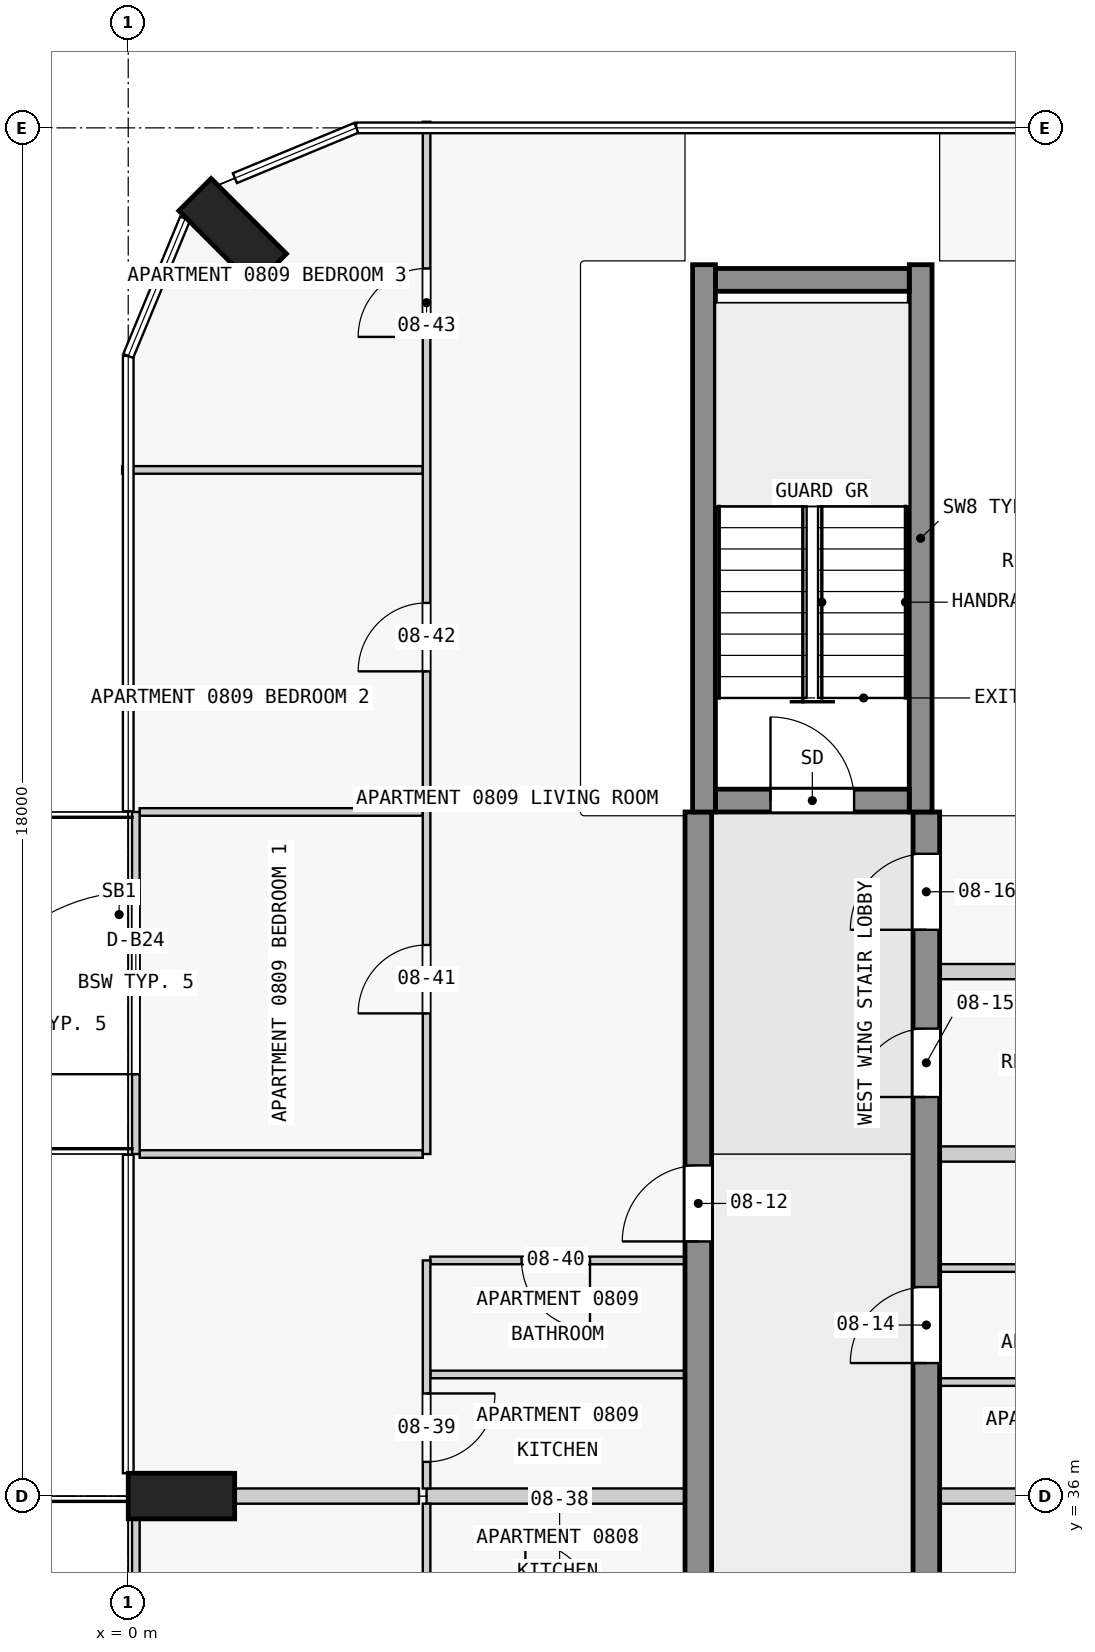
"""IFC4 building model, lengths in metres.
Left out: names, types, materials, properties, quantities, classifications, styles, units other than length and angle.
Written with IfcOpenShell. Run it as: python <this file> out.ifc"""

import sys

from ifc_helpers import new_model, si_unit, direction, frame, frame_2d, origin, origin_2d, place, context, subcontext, project, spatial, rectangle, extrude, element, fill, save


model = new_model("IFC4")
c1 = context("Model", 3, precision=1e-05, world=origin(), true_north=direction((0.0, 1.0)))
c2 = subcontext(c1, "Body", "Model", "MODEL_VIEW")
j1 = project(units=[si_unit("LENGTHUNIT", "METRE"), si_unit("PLANEANGLEUNIT", "RADIAN")], contexts=[c1])
p1 = place(None, origin())
s1 = spatial("IfcSite", under=j1, at=p1, CompositionType="ELEMENT")
p2 = place(p1, origin())
s2 = spatial("IfcBuilding", under=s1, at=p2, CompositionType="ELEMENT")
p3 = place(p2, frame((0.0, 0.0, 37.3)))
s3 = spatial("IfcBuildingStorey", under=s2, at=p3, CompositionType="ELEMENT", Elevation=37.3)
for number, where, z_axis, x_axis in (
    (1, (1.374, 52.626, 0.0), (0.0, 0.0, 1.0), (0.707, 0.707, 0.0)),
    (2, (0.7, 36.0, 0.0), (0.0, 0.0, 1.0), (0.0, 1.0, 0.0)),
):
    element("IfcColumn", number, at=place(p3, frame(where, z_axis=z_axis, x_axis=x_axis)), inside=s3, PredefinedType="COLUMN", context=c2, shape_type="SweptSolid", body=[
        extrude(rectangle(XDim=0.6, YDim=1.4, at=origin_2d()), origin(), (0.0, 0.0, 1.0), 3.5),
    ])
p4 = place(p3, frame((7.725, 45.15, 0.0), z_axis=(0.0, 0.0, 1.0), x_axis=(1.0, 0.0, 0.0)))
e3 = element("IfcWall", 3, at=p4, inside=s3, PredefinedType="SHEAR", context=c2, shape_type="SweptSolid", body=[
    extrude(rectangle(XDim=2.55, YDim=0.3, at=frame_2d((1.275, 0.0))), origin(), (0.0, 0.0, 1.0), 3.5),
])
p5 = place(p4, frame((0.725, 0.0, 0.0)))
e4 = element("IfcOpeningElement", 4, at=p5, cuts=e3, PredefinedType="OPENING", context=c2, shape_type="SweptSolid", body=[
    extrude(rectangle(XDim=1.1, YDim=2.1, at=frame_2d((0.55, 1.05))), frame((0.0, 0.16, 0.0), z_axis=(0.0, -1.0, 0.0), x_axis=(1.0, 0.0, 0.0)), (0.0, 0.0, 1.0), 0.32),
])
p6 = place(p3, frame((7.725, 52.0, 0.0), z_axis=(0.0, 0.0, 1.0), x_axis=(1.0, 0.0, 0.0)))
e5 = element("IfcWall", 5, at=p6, inside=s3, PredefinedType="SHEAR", context=c2, shape_type="SweptSolid", body=[
    extrude(rectangle(XDim=2.55, YDim=0.3, at=frame_2d((1.275, 0.0))), origin(), (0.0, 0.0, 1.0), 3.5),
])
for number, where, z_axis, x_axis in (
    (6, (7.575, 45.0, 0.0), (0.0, 0.0, 1.0), (0.0, 1.0, 0.0)),
    (7, (10.425, 45.0, 0.0), (0.0, 0.0, 1.0), (0.0, 1.0, 0.0)),
):
    element("IfcWall", number, at=place(p3, frame(where, z_axis=z_axis, x_axis=x_axis)), inside=s3, PredefinedType="SHEAR", context=c2, shape_type="SweptSolid", body=[
        extrude(rectangle(XDim=7.2, YDim=0.3, at=frame_2d((3.6, 0.0))), origin(), (0.0, 0.0, 1.0), 3.5),
    ])
p7 = place(p3, frame((7.5, 18.0, 0.0), z_axis=(0.0, 0.0, 1.0), x_axis=(0.0, 1.0, 0.0)))
e8 = element("IfcWall", 8, at=p7, inside=s3, PredefinedType="SHEAR", context=c2, shape_type="SweptSolid", body=[
    extrude(rectangle(XDim=27.0, YDim=0.35, at=frame_2d((13.5, 0.0))), origin(), (0.0, 0.0, 1.0), 3.25),
])
p8 = place(p7, frame((1.75, 0.0, 0.0)))
e9 = element("IfcOpeningElement", 9, at=p8, cuts=e8, PredefinedType="OPENING", context=c2, shape_type="SweptSolid", body=[
    extrude(rectangle(XDim=1.0, YDim=2.1, at=frame_2d((0.5, 1.05))), frame((0.0, 0.185, 0.0), z_axis=(0.0, -1.0, 0.0), x_axis=(1.0, 0.0, 0.0)), (0.0, 0.0, 1.0), 0.37),
])
p9 = place(p7, frame((8.55, 0.0, 0.0)))
e10 = element("IfcOpeningElement", 10, at=p9, cuts=e8, PredefinedType="OPENING", context=c2, shape_type="SweptSolid", body=[
    extrude(rectangle(XDim=1.0, YDim=2.1, at=frame_2d((0.5, 1.05))), frame((0.0, 0.185, 0.0), z_axis=(0.0, -1.0, 0.0), x_axis=(1.0, 0.0, 0.0)), (0.0, 0.0, 1.0), 0.37),
])
p10 = place(p7, frame((15.25, 0.0, 0.0)))
e11 = element("IfcOpeningElement", 11, at=p10, cuts=e8, PredefinedType="OPENING", context=c2, shape_type="SweptSolid", body=[
    extrude(rectangle(XDim=1.0, YDim=2.1, at=frame_2d((0.5, 1.05))), frame((0.0, 0.185, 0.0), z_axis=(0.0, -1.0, 0.0), x_axis=(1.0, 0.0, 0.0)), (0.0, 0.0, 1.0), 0.37),
])
p11 = place(p7, frame((21.35, 0.0, 0.0)))
e12 = element("IfcOpeningElement", 12, at=p11, cuts=e8, PredefinedType="OPENING", context=c2, shape_type="SweptSolid", body=[
    extrude(rectangle(XDim=1.0, YDim=2.1, at=frame_2d((0.5, 1.05))), frame((0.0, 0.185, 0.0), z_axis=(0.0, -1.0, 0.0), x_axis=(1.0, 0.0, 0.0)), (0.0, 0.0, 1.0), 0.37),
])
p12 = place(p3, frame((10.5, 18.0, 0.0), z_axis=(0.0, 0.0, 1.0), x_axis=(0.0, 1.0, 0.0)))
e13 = element("IfcWall", 13, at=p12, inside=s3, PredefinedType="SHEAR", context=c2, shape_type="SweptSolid", body=[
    extrude(rectangle(XDim=27.0, YDim=0.35, at=frame_2d((13.5, 0.0))), origin(), (0.0, 0.0, 1.0), 3.25),
])
p13 = place(p12, frame((7.45, 0.0, 0.0)))
e14 = element("IfcOpeningElement", 14, at=p13, cuts=e13, PredefinedType="OPENING", context=c2, shape_type="SweptSolid", body=[
    extrude(rectangle(XDim=1.0, YDim=2.1, at=frame_2d((0.5, 1.05))), frame((0.0, 0.185, 0.0), z_axis=(0.0, -1.0, 0.0), x_axis=(1.0, 0.0, 0.0)), (0.0, 0.0, 1.0), 0.37),
])
p14 = place(p12, frame((19.75, 0.0, 0.0)))
e15 = element("IfcOpeningElement", 15, at=p14, cuts=e13, PredefinedType="OPENING", context=c2, shape_type="SweptSolid", body=[
    extrude(rectangle(XDim=1.0, YDim=2.1, at=frame_2d((0.5, 1.05))), frame((0.0, 0.185, 0.0), z_axis=(0.0, -1.0, 0.0), x_axis=(1.0, 0.0, 0.0)), (0.0, 0.0, 1.0), 0.37),
])
p15 = place(p12, frame((23.25, 0.0, 0.0)))
e16 = element("IfcOpeningElement", 16, at=p15, cuts=e13, PredefinedType="OPENING", context=c2, shape_type="SweptSolid", body=[
    extrude(rectangle(XDim=0.9, YDim=2.1, at=frame_2d((0.45, 1.05))), frame((0.0, 0.185, 0.0), z_axis=(0.0, -1.0, 0.0), x_axis=(1.0, 0.0, 0.0)), (0.0, 0.0, 1.0), 0.37),
])
p16 = place(p12, frame((25.45, 0.0, 0.0)))
e17 = element("IfcOpeningElement", 17, at=p16, cuts=e13, PredefinedType="OPENING", context=c2, shape_type="SweptSolid", body=[
    extrude(rectangle(XDim=1.0, YDim=2.1, at=frame_2d((0.5, 1.05))), frame((0.0, 0.185, 0.0), z_axis=(0.0, -1.0, 0.0), x_axis=(1.0, 0.0, 0.0)), (0.0, 0.0, 1.0), 0.37),
])
p17 = place(p3, frame((0.1, 31.5, 0.0), z_axis=(0.0, 0.0, 1.0), x_axis=(0.0, 1.0, 0.0)))
e18 = element("IfcWall", 18, at=p17, inside=s3, PredefinedType="STANDARD", context=c2, shape_type="SweptSolid", body=[
    extrude(rectangle(XDim=4.5, YDim=0.1, at=frame_2d((2.25, 0.0))), origin(), (0.0, 0.0, 1.0), 3.25),
])
p18 = place(p17, frame((1.05, 0.0, 0.0)))
e19 = element("IfcOpeningElement", 19, at=p18, cuts=e18, PredefinedType="OPENING", context=c2, shape_type="SweptSolid", body=[
    extrude(rectangle(XDim=2.4, YDim=2.4, at=frame_2d((1.2, 1.2))), frame((0.0, 0.06, 0.0), z_axis=(0.0, -1.0, 0.0), x_axis=(1.0, 0.0, 0.0)), (0.0, 0.0, 1.0), 0.12),
])
p19 = place(p3, frame((0.1, 40.5, 0.0), z_axis=(0.0, 0.0, 1.0), x_axis=(0.0, 1.0, 0.0)))
e20 = element("IfcWall", 20, at=p19, inside=s3, PredefinedType="STANDARD", context=c2, shape_type="SweptSolid", body=[
    extrude(rectangle(XDim=4.5, YDim=0.1, at=frame_2d((2.25, 0.0))), origin(), (0.0, 0.0, 1.0), 3.25),
])
p20 = place(p19, frame((1.05, 0.0, 0.0)))
e21 = element("IfcOpeningElement", 21, at=p20, cuts=e20, PredefinedType="OPENING", context=c2, shape_type="SweptSolid", body=[
    extrude(rectangle(XDim=2.4, YDim=2.4, at=frame_2d((1.2, 1.2))), frame((0.0, 0.06, 0.0), z_axis=(0.0, -1.0, 0.0), x_axis=(1.0, 0.0, 0.0)), (0.0, 0.0, 1.0), 0.12),
])
p21 = place(p3, frame((7.325, 36.0, 0.0), z_axis=(0.0, 0.0, 1.0), x_axis=(-1.0, 0.0, 0.0)))
e22 = element("IfcWall", 22, at=p21, inside=s3, PredefinedType="PARTITIONING", context=c2, shape_type="SweptSolid", body=[
    extrude(rectangle(XDim=3.4, YDim=0.2, at=frame_2d((1.7, 0.0))), origin(), (0.0, 0.0, 1.0), 3.25),
])
p22 = place(p3, frame((16.6, 36.0, 0.0), z_axis=(0.0, 0.0, 1.0), x_axis=(-1.0, 0.0, 0.0)))
e23 = element("IfcWall", 23, at=p22, inside=s3, PredefinedType="PARTITIONING", context=c2, shape_type="SweptSolid", body=[
    extrude(rectangle(XDim=5.925, YDim=0.2, at=frame_2d((2.962, 0.0))), origin(), (0.0, 0.0, 1.0), 3.25),
])
p23 = place(p3, frame((1.4, 36.0, 0.0), z_axis=(0.0, 0.0, 1.0), x_axis=(1.0, 0.0, 0.0)))
e24 = element("IfcWall", 24, at=p23, inside=s3, PredefinedType="PARTITIONING", context=c2, shape_type="SweptSolid", body=[
    extrude(rectangle(XDim=2.425, YDim=0.2, at=frame_2d((1.212, 0.0))), origin(), (0.0, 0.0, 1.0), 3.25),
])
p24 = place(p3, frame((14.025, 37.5, 0.0), z_axis=(0.0, 0.0, 1.0), x_axis=(-1.0, 0.0, 0.0)))
e25 = element("IfcWall", 25, at=p24, inside=s3, PredefinedType="PARTITIONING", context=c2, shape_type="SweptSolid", body=[
    extrude(rectangle(XDim=3.35, YDim=0.1, at=frame_2d((1.675, 0.0))), origin(), (0.0, 0.0, 1.0), 3.25),
])
p25 = place(p24, frame((1.25, 0.0, 0.0)))
e26 = element("IfcOpeningElement", 26, at=p25, cuts=e25, PredefinedType="OPENING", context=c2, shape_type="SweptSolid", body=[
    extrude(rectangle(XDim=0.9, YDim=2.1, at=frame_2d((0.45, 1.05))), frame((0.0, 0.06, 0.0), z_axis=(0.0, -1.0, 0.0), x_axis=(1.0, 0.0, 0.0)), (0.0, 0.0, 1.0), 0.12),
])
p26 = place(p3, frame((7.325, 37.6, 0.0), z_axis=(0.0, 0.0, 1.0), x_axis=(-1.0, 0.0, 0.0)))
e27 = element("IfcWall", 27, at=p26, inside=s3, PredefinedType="PARTITIONING", context=c2, shape_type="SweptSolid", body=[
    extrude(rectangle(XDim=3.35, YDim=0.1, at=frame_2d((1.675, 0.0))), origin(), (0.0, 0.0, 1.0), 3.25),
])
p27 = place(p3, frame((10.675, 39.0, 0.0), z_axis=(0.0, 0.0, 1.0), x_axis=(1.0, 0.0, 0.0)))
e28 = element("IfcWall", 28, at=p27, inside=s3, PredefinedType="PARTITIONING", context=c2, shape_type="SweptSolid", body=[
    extrude(rectangle(XDim=3.4, YDim=0.1, at=frame_2d((1.7, 0.0))), origin(), (0.0, 0.0, 1.0), 3.25),
])
p28 = place(p27, frame((1.25, 0.0, 0.0)))
e29 = element("IfcOpeningElement", 29, at=p28, cuts=e28, PredefinedType="OPENING", context=c2, shape_type="SweptSolid", body=[
    extrude(rectangle(XDim=0.9, YDim=2.1, at=frame_2d((0.45, 1.05))), frame((0.0, 0.06, 0.0), z_axis=(0.0, -1.0, 0.0), x_axis=(1.0, 0.0, 0.0)), (0.0, 0.0, 1.0), 0.12),
])
p29 = place(p3, frame((7.325, 39.1, 0.0), z_axis=(0.0, 0.0, 1.0), x_axis=(-1.0, 0.0, 0.0)))
e30 = element("IfcWall", 30, at=p29, inside=s3, PredefinedType="PARTITIONING", context=c2, shape_type="SweptSolid", body=[
    extrude(rectangle(XDim=3.35, YDim=0.1, at=frame_2d((1.675, 0.0))), origin(), (0.0, 0.0, 1.0), 3.25),
])
p30 = place(p29, frame((1.25, 0.0, 0.0)))
e31 = element("IfcOpeningElement", 31, at=p30, cuts=e30, PredefinedType="OPENING", context=c2, shape_type="SweptSolid", body=[
    extrude(rectangle(XDim=0.9, YDim=2.1, at=frame_2d((0.45, 1.05))), frame((0.0, 0.06, 0.0), z_axis=(0.0, -1.0, 0.0), x_axis=(1.0, 0.0, 0.0)), (0.0, 0.0, 1.0), 0.12),
])
p31 = place(p3, frame((0.15, 40.5, 0.0), z_axis=(0.0, 0.0, 1.0), x_axis=(1.0, 0.0, 0.0)))
e32 = element("IfcWall", 32, at=p31, inside=s3, PredefinedType="PARTITIONING", context=c2, shape_type="SweptSolid", body=[
    extrude(rectangle(XDim=3.725, YDim=0.1, at=frame_2d((1.863, 0.0))), origin(), (0.0, 0.0, 1.0), 3.25),
])
p32 = place(p3, frame((13.975, 40.5, 0.0), z_axis=(0.0, 0.0, 1.0), x_axis=(-1.0, 0.0, 0.0)))
e33 = element("IfcWall", 33, at=p32, inside=s3, PredefinedType="PARTITIONING", context=c2, shape_type="SweptSolid", body=[
    extrude(rectangle(XDim=3.3, YDim=0.2, at=frame_2d((1.65, 0.0))), origin(), (0.0, 0.0, 1.0), 3.25),
])
p33 = place(p3, frame((14.075, 42.9, 0.0), z_axis=(0.0, 0.0, 1.0), x_axis=(-1.0, 0.0, 0.0)))
e34 = element("IfcWall", 34, at=p33, inside=s3, PredefinedType="PARTITIONING", context=c2, shape_type="SweptSolid", body=[
    extrude(rectangle(XDim=3.4, YDim=0.2, at=frame_2d((1.7, 0.0))), origin(), (0.0, 0.0, 1.0), 3.25),
])
p34 = place(p3, frame((3.875, 45.0, 0.0), z_axis=(0.0, 0.0, 1.0), x_axis=(-1.0, 0.0, 0.0)))
e35 = element("IfcWall", 35, at=p34, inside=s3, PredefinedType="PARTITIONING", context=c2, shape_type="SweptSolid", body=[
    extrude(rectangle(XDim=3.725, YDim=0.1, at=frame_2d((1.863, 0.0))), origin(), (0.0, 0.0, 1.0), 3.25),
])
p35 = place(p3, frame((3.875, 49.5, 0.0), z_axis=(0.0, 0.0, 1.0), x_axis=(-1.0, 0.0, 0.0)))
e36 = element("IfcWall", 36, at=p35, inside=s3, PredefinedType="PARTITIONING", context=c2, shape_type="SweptSolid", body=[
    extrude(rectangle(XDim=3.955, YDim=0.1, at=frame_2d((1.978, 0.0))), origin(), (0.0, 0.0, 1.0), 3.25),
])
p36 = place(p3, frame((3.925, 35.9, 0.0), z_axis=(0.0, 0.0, 1.0), x_axis=(0.0, -1.0, 0.0)))
e37 = element("IfcWall", 37, at=p36, inside=s3, PredefinedType="PARTITIONING", context=c2, shape_type="SweptSolid", body=[
    extrude(rectangle(XDim=1.4, YDim=0.1, at=frame_2d((0.7, 0.0))), origin(), (0.0, 0.0, 1.0), 3.25),
])
p37 = place(p3, frame((3.925, 39.1, 0.0), z_axis=(0.0, 0.0, 1.0), x_axis=(0.0, -1.0, 0.0)))
e38 = element("IfcWall", 38, at=p37, inside=s3, PredefinedType="PARTITIONING", context=c2, shape_type="SweptSolid", body=[
    extrude(rectangle(XDim=3.0, YDim=0.1, at=frame_2d((1.5, 0.0))), origin(), (0.0, 0.0, 1.0), 3.25),
])
p38 = place(p37, frame((1.75, 0.0, 0.0)))
e39 = element("IfcOpeningElement", 39, at=p38, cuts=e38, PredefinedType="OPENING", context=c2, shape_type="SweptSolid", body=[
    extrude(rectangle(XDim=0.9, YDim=2.1, at=frame_2d((0.45, 1.05))), frame((0.0, 0.06, 0.0), z_axis=(0.0, -1.0, 0.0), x_axis=(1.0, 0.0, 0.0)), (0.0, 0.0, 1.0), 0.12),
])
p39 = place(p3, frame((3.925, 40.5, 0.0), z_axis=(0.0, 0.0, 1.0), x_axis=(0.0, 1.0, 0.0)))
e40 = element("IfcWall", 40, at=p39, inside=s3, PredefinedType="PARTITIONING", context=c2, shape_type="SweptSolid", body=[
    extrude(rectangle(XDim=13.58, YDim=0.1, at=frame_2d((6.79, 0.0))), origin(), (0.0, 0.0, 1.0), 3.25),
])
p40 = place(p39, frame((1.85, 0.0, 0.0)))
e41 = element("IfcOpeningElement", 41, at=p40, cuts=e40, PredefinedType="OPENING", context=c2, shape_type="SweptSolid", body=[
    extrude(rectangle(XDim=0.9, YDim=2.1, at=frame_2d((0.45, 1.05))), frame((0.0, 0.06, 0.0), z_axis=(0.0, -1.0, 0.0), x_axis=(1.0, 0.0, 0.0)), (0.0, 0.0, 1.0), 0.12),
])
p41 = place(p39, frame((6.35, 0.0, 0.0)))
e42 = element("IfcOpeningElement", 42, at=p41, cuts=e40, PredefinedType="OPENING", context=c2, shape_type="SweptSolid", body=[
    extrude(rectangle(XDim=0.9, YDim=2.1, at=frame_2d((0.45, 1.05))), frame((0.0, 0.06, 0.0), z_axis=(0.0, -1.0, 0.0), x_axis=(1.0, 0.0, 0.0)), (0.0, 0.0, 1.0), 0.12),
])
p42 = place(p39, frame((10.75, 0.0, 0.0)))
e43 = element("IfcOpeningElement", 43, at=p42, cuts=e40, PredefinedType="OPENING", context=c2, shape_type="SweptSolid", body=[
    extrude(rectangle(XDim=0.9, YDim=2.1, at=frame_2d((0.45, 1.05))), frame((0.0, 0.06, 0.0), z_axis=(0.0, -1.0, 0.0), x_axis=(1.0, 0.0, 0.0)), (0.0, 0.0, 1.0), 0.12),
])
p43 = place(p20, origin())
e44 = element("IfcDoor", 44, at=p43, inside=s3, OperationType="SINGLE_SWING_LEFT", PredefinedType="DOOR", context=c2, shape_type="SweptSolid", body=[
    extrude(rectangle(XDim=2.4, YDim=2.4, at=frame_2d((1.2, 1.2))), frame((0.0, 0.025, 0.0), z_axis=(0.0, -1.0, 0.0), x_axis=(1.0, 0.0, 0.0)), (0.0, 0.0, 1.0), 0.05),
])
fill(e21, e44)
p44 = place(p5, origin())
e45 = element("IfcDoor", 45, at=p44, inside=s3, OperationType="SINGLE_SWING_LEFT", PredefinedType="DOOR", context=c2, shape_type="SweptSolid", body=[
    extrude(rectangle(XDim=1.1, YDim=2.1, at=frame_2d((0.55, 1.05))), frame((0.0, 0.025, 0.0), z_axis=(0.0, -1.0, 0.0), x_axis=(1.0, 0.0, 0.0)), (0.0, 0.0, 1.0), 0.05),
])
fill(e4, e45)
p45 = place(p11, origin())
e46 = element("IfcDoor", 46, at=p45, inside=s3, OperationType="SINGLE_SWING_RIGHT", PredefinedType="DOOR", context=c2, shape_type="SweptSolid", body=[
    extrude(rectangle(XDim=1.0, YDim=2.1, at=frame_2d((0.5, 1.05))), frame((0.0, 0.025, 0.0), z_axis=(0.0, -1.0, 0.0), x_axis=(1.0, 0.0, 0.0)), (0.0, 0.0, 1.0), 0.05),
])
fill(e12, e46)
p46 = place(p14, origin())
e47 = element("IfcDoor", 47, at=p46, inside=s3, OperationType="SINGLE_SWING_RIGHT", PredefinedType="DOOR", context=c2, shape_type="SweptSolid", body=[
    extrude(rectangle(XDim=1.0, YDim=2.1, at=frame_2d((0.5, 1.05))), frame((0.0, 0.025, 0.0), z_axis=(0.0, -1.0, 0.0), x_axis=(1.0, 0.0, 0.0)), (0.0, 0.0, 1.0), 0.05),
])
fill(e15, e47)
p47 = place(p15, origin())
e48 = element("IfcDoor", 48, at=p47, inside=s3, OperationType="SINGLE_SWING_RIGHT", PredefinedType="DOOR", context=c2, shape_type="SweptSolid", body=[
    extrude(rectangle(XDim=0.9, YDim=2.1, at=frame_2d((0.45, 1.05))), frame((0.0, 0.025, 0.0), z_axis=(0.0, -1.0, 0.0), x_axis=(1.0, 0.0, 0.0)), (0.0, 0.0, 1.0), 0.05),
])
fill(e16, e48)
p48 = place(p16, origin())
e49 = element("IfcDoor", 49, at=p48, inside=s3, OperationType="SINGLE_SWING_RIGHT", PredefinedType="DOOR", context=c2, shape_type="SweptSolid", body=[
    extrude(rectangle(XDim=1.0, YDim=2.1, at=frame_2d((0.5, 1.05))), frame((0.0, 0.025, 0.0), z_axis=(0.0, -1.0, 0.0), x_axis=(1.0, 0.0, 0.0)), (0.0, 0.0, 1.0), 0.05),
])
fill(e17, e49)
p49 = place(p38, origin())
e50 = element("IfcDoor", 50, at=p49, inside=s3, OperationType="SINGLE_SWING_RIGHT", PredefinedType="DOOR", context=c2, shape_type="SweptSolid", body=[
    extrude(rectangle(XDim=0.9, YDim=2.1, at=frame_2d((0.45, 1.05))), frame((0.0, 0.025, 0.0), z_axis=(0.0, -1.0, 0.0), x_axis=(1.0, 0.0, 0.0)), (0.0, 0.0, 1.0), 0.05),
])
fill(e39, e50)
p50 = place(p30, origin())
e51 = element("IfcDoor", 51, at=p50, inside=s3, OperationType="SINGLE_SWING_RIGHT", PredefinedType="DOOR", context=c2, shape_type="SweptSolid", body=[
    extrude(rectangle(XDim=0.9, YDim=2.1, at=frame_2d((0.45, 1.05))), frame((0.0, 0.025, 0.0), z_axis=(0.0, -1.0, 0.0), x_axis=(1.0, 0.0, 0.0)), (0.0, 0.0, 1.0), 0.05),
])
fill(e31, e51)
p51 = place(p40, origin())
e52 = element("IfcDoor", 52, at=p51, inside=s3, OperationType="SINGLE_SWING_LEFT", PredefinedType="DOOR", context=c2, shape_type="SweptSolid", body=[
    extrude(rectangle(XDim=0.9, YDim=2.1, at=frame_2d((0.45, 1.05))), frame((0.0, 0.025, 0.0), z_axis=(0.0, -1.0, 0.0), x_axis=(1.0, 0.0, 0.0)), (0.0, 0.0, 1.0), 0.05),
])
fill(e41, e52)
p52 = place(p41, origin())
e53 = element("IfcDoor", 53, at=p52, inside=s3, OperationType="SINGLE_SWING_RIGHT", PredefinedType="DOOR", context=c2, shape_type="SweptSolid", body=[
    extrude(rectangle(XDim=0.9, YDim=2.1, at=frame_2d((0.45, 1.05))), frame((0.0, 0.025, 0.0), z_axis=(0.0, -1.0, 0.0), x_axis=(1.0, 0.0, 0.0)), (0.0, 0.0, 1.0), 0.05),
])
fill(e42, e53)
p53 = place(p42, origin())
e54 = element("IfcDoor", 54, at=p53, inside=s3, OperationType="SINGLE_SWING_RIGHT", PredefinedType="DOOR", context=c2, shape_type="SweptSolid", body=[
    extrude(rectangle(XDim=0.9, YDim=2.1, at=frame_2d((0.45, 1.05))), frame((0.0, 0.025, 0.0), z_axis=(0.0, -1.0, 0.0), x_axis=(1.0, 0.0, 0.0)), (0.0, 0.0, 1.0), 0.05),
])
fill(e43, e54)
save(model, sys.argv[1])
